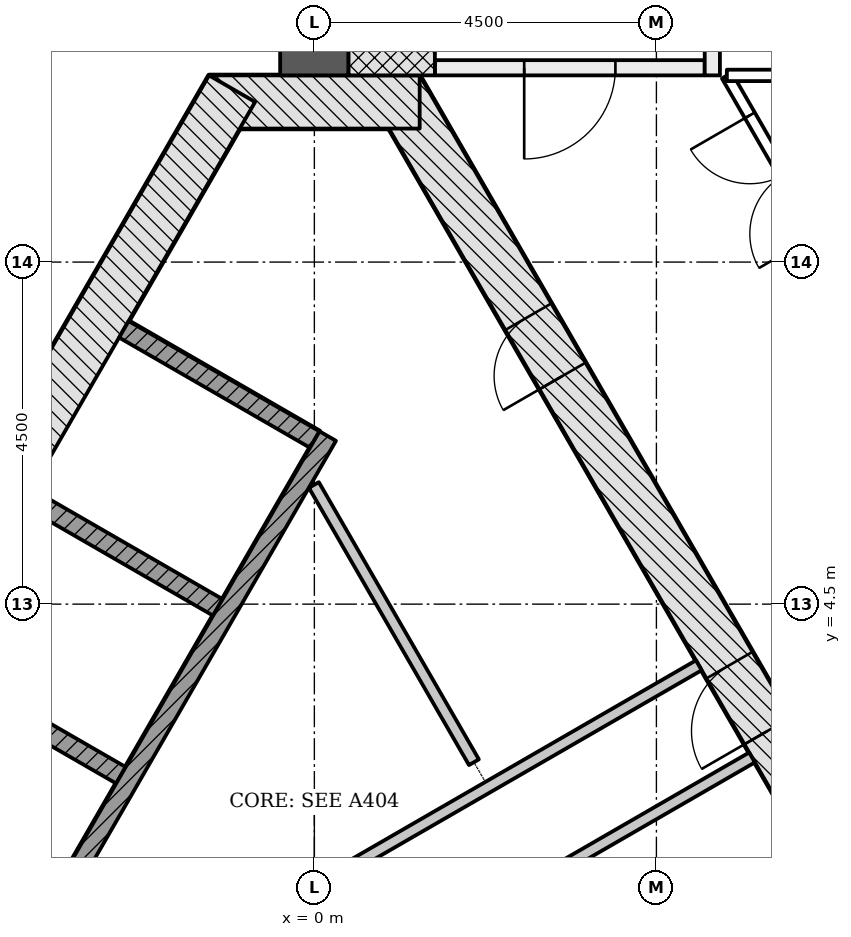
"""IFC4 building model, lengths in metres.
Left out: names, types, materials, properties, quantities, classifications, styles, units other than length and angle.
Written with IfcOpenShell. Run it as: python <this file> out.ifc"""

import sys

from ifc_helpers import new_model, si_unit, direction, frame, frame_2d, origin, place, context, subcontext, project, spatial, rectangle, extrude, element, fill, save


model = new_model("IFC4")
c1 = context("Model", 3, precision=1e-05, world=origin(), true_north=direction((0.0, 1.0)))
c2 = subcontext(c1, "Body", "Model", "MODEL_VIEW")
j1 = project(units=[si_unit("LENGTHUNIT", "METRE"), si_unit("PLANEANGLEUNIT", "RADIAN")], contexts=[c1])
p1 = place(None, origin())
s1 = spatial("IfcSite", under=j1, at=p1, CompositionType="ELEMENT")
p2 = place(p1, origin())
s2 = spatial("IfcBuilding", under=s1, at=p2, CompositionType="ELEMENT")
p3 = place(p2, frame((0.0, 0.0, 15.0)))
s3 = spatial("IfcBuildingStorey", under=s2, at=p3, CompositionType="ELEMENT", Elevation=15.0)
p4 = place(p3, frame((10.311, -4.703, -0.25), z_axis=(0.0, 0.0, 1.0), x_axis=(-0.500001446645, 0.866024568562, 0.0)))
e1 = element("IfcWall", 1, at=p4, inside=s3, PredefinedType="SHEAR", context=c2, shape_type="SweptSolid", body=[
    extrude(rectangle(XDim=18.458, YDim=0.7, at=frame_2d((9.229, 0.0))), origin(), (0.0, 0.0, 1.0), 4.5),
])
p5 = place(p4, frame((8.7, 0.0, 0.25)))
e2 = element("IfcOpeningElement", 2, at=p5, cuts=e1, PredefinedType="OPENING", context=c2, shape_type="SweptSolid", body=[
    extrude(rectangle(XDim=1.0, YDim=2.1, at=frame_2d((0.5, 1.05))), frame((0.0, 0.36, 0.0), z_axis=(0.0, -1.0, 0.0), x_axis=(1.0, 0.0, 0.0)), (0.0, 0.0, 1.0), 0.72),
])
p6 = place(p4, frame((4.002, 0.0, 0.25)))
e3 = element("IfcOpeningElement", 3, at=p6, cuts=e1, PredefinedType="OPENING", context=c2, shape_type="SweptSolid", body=[
    extrude(rectangle(XDim=0.9, YDim=2.1, at=frame_2d((0.45, 1.05))), frame((0.0, 0.36, 0.0), z_axis=(0.0, -1.0, 0.0), x_axis=(1.0, 0.0, 0.0)), (0.0, 0.0, 1.0), 0.72),
])
p7 = place(p4, frame((14.093, 0.0, 0.25)))
e4 = element("IfcOpeningElement", 4, at=p7, cuts=e1, PredefinedType="OPENING", context=c2, shape_type="SweptSolid", body=[
    extrude(rectangle(XDim=0.9, YDim=2.1, at=frame_2d((0.45, 1.05))), frame((0.0, 0.36, 0.0), z_axis=(0.0, -1.0, 0.0), x_axis=(1.0, 0.0, 0.0)), (0.0, 0.0, 1.0), 0.72),
])
p8 = place(p3, frame((1.386, 11.106, -0.25), z_axis=(0.0, 0.0, 1.0), x_axis=(-1.0, 0.0, 0.0)))
e5 = element("IfcWall", 5, at=p8, inside=s3, PredefinedType="SHEAR", context=c2, shape_type="SweptSolid", body=[
    extrude(rectangle(XDim=2.771, YDim=0.7, at=frame_2d((1.386, 0.0))), origin(), (0.0, 0.0, 1.0), 4.5),
])
p9 = place(p3, frame((-1.083, 11.281, -0.25), z_axis=(0.0, 0.0, 1.0), x_axis=(-0.500001446645, -0.866024568562, 0.0)))
e6 = element("IfcWall", 6, at=p9, inside=s3, PredefinedType="SHEAR", context=c2, shape_type="SweptSolid", body=[
    extrude(rectangle(XDim=18.458, YDim=0.7, at=frame_2d((9.229, 0.0))), origin(), (0.0, 0.0, 1.0), 4.5),
])
p10 = place(p9, frame((8.979, 0.0, 0.25)))
e7 = element("IfcOpeningElement", 7, at=p10, cuts=e6, PredefinedType="OPENING", context=c2, shape_type="SweptSolid", body=[
    extrude(rectangle(XDim=1.2, YDim=2.1, at=frame_2d((0.6, 1.05))), frame((0.0, 0.36, 0.0), z_axis=(0.0, -1.0, 0.0), x_axis=(1.0, 0.0, 0.0)), (0.0, 0.0, 1.0), 0.72),
])
p11 = place(p9, frame((11.029, 0.0, 0.25)))
e8 = element("IfcOpeningElement", 8, at=p11, cuts=e6, PredefinedType="OPENING", context=c2, shape_type="SweptSolid", body=[
    extrude(rectangle(XDim=1.2, YDim=2.1, at=frame_2d((0.6, 1.05))), frame((0.0, 0.36, 0.0), z_axis=(0.0, -1.0, 0.0), x_axis=(1.0, 0.0, 0.0)), (0.0, 0.0, 1.0), 0.72),
])
p12 = place(p3, frame((0.0, 11.456, -0.25), z_axis=(0.0, 0.0, 1.0), x_axis=(0.0, 1.0, 0.0)))
e9 = element("IfcWall", 9, at=p12, inside=s3, PredefinedType="SHEAR", context=c2, shape_type="SweptSolid", body=[
    extrude(rectangle(XDim=14.633, YDim=0.9, at=frame_2d((7.316, 0.0))), origin(), (0.0, 0.0, 1.0), 4.5),
])
p13 = place(p12, frame((7.35, 0.0, 0.25)))
e10 = element("IfcOpeningElement", 10, at=p13, cuts=e9, PredefinedType="OPENING", context=c2, shape_type="SweptSolid", body=[
    extrude(rectangle(XDim=1.5, YDim=2.1, at=frame_2d((0.75, 1.05))), frame((0.0, 0.46, 0.0), z_axis=(0.0, -1.0, 0.0), x_axis=(1.0, 0.0, 0.0)), (0.0, 0.0, 1.0), 0.92),
])
p14 = place(p3, frame((-2.506, 8.115, -0.25), z_axis=(0.0, 0.0, 1.0), x_axis=(0.865996321171, -0.50005036918, 0.0)))
e11 = element("IfcWall", 11, at=p14, inside=s3, PredefinedType="PARTITIONING", context=c2, shape_type="SweptSolid", body=[
    extrude(rectangle(XDim=2.9, YDim=0.25, at=frame_2d((1.45, 0.0))), origin(), (0.0, 0.0, 1.0), 4.5),
])
for number, where, z_axis, x_axis in (
    (12, (-3.781, 5.907, -0.25), (0.0, 0.0, 1.0), (0.866, -0.5, 0.0)),
    (13, (-5.056, 3.699, -0.25), (0.0, 0.0, 1.0), (0.866, -0.5, 0.0)),
):
    element("IfcWall", number, at=place(p3, frame(where, z_axis=z_axis, x_axis=x_axis)), inside=s3, PredefinedType="PARTITIONING", context=c2, shape_type="SweptSolid", body=[
        extrude(rectangle(XDim=2.9, YDim=0.25, at=frame_2d((1.45, 0.0))), origin(), (0.0, 0.0, 1.0), 4.5),
    ])
p15 = place(p3, frame((0.176, 6.711, 0.0), z_axis=(0.0, 0.0, 1.0), x_axis=(-0.500004227369, -0.866022963098, 0.0)))
e14 = element("IfcWall", 14, at=p15, inside=s3, PredefinedType="PARTITIONING", context=c2, shape_type="SweptSolid", body=[
    extrude(rectangle(XDim=11.8, YDim=0.25, at=frame_2d((5.9, 0.0))), origin(), (0.0, 0.0, 1.0), 4.25),
])
p16 = place(p3, frame((-4.548, -1.851, 0.0), z_axis=(0.0, 0.0, 1.0), x_axis=(0.866023939251, 0.500002536638, 0.0)))
e15 = element("IfcWall", 15, at=p16, inside=s3, PredefinedType="PARTITIONING", context=c2, shape_type="SweptSolid", body=[
    extrude(rectangle(XDim=11.092, YDim=0.15, at=frame_2d((5.546, 0.0))), origin(), (0.0, 0.0, 1.0), 4.25),
])
p17 = place(p16, frame((3.497, 0.0, 0.0)))
e16 = element("IfcOpeningElement", 16, at=p17, cuts=e15, PredefinedType="OPENING", context=c2, shape_type="SweptSolid", body=[
    extrude(rectangle(XDim=0.9, YDim=2.1, at=frame_2d((0.45, 1.05))), frame((0.0, 0.085, 0.0), z_axis=(0.0, -1.0, 0.0), x_axis=(1.0, 0.0, 0.0)), (0.0, 0.0, 1.0), 0.17),
])
p18 = place(p3, frame((2.099, 2.42, 0.0), z_axis=(0.0, 0.0, 1.0), x_axis=(-0.499998449073, 0.866026299211, 0.0)))
e17 = element("IfcWall", 17, at=p18, inside=s3, PredefinedType="PARTITIONING", context=c2, shape_type="SweptSolid", body=[
    extrude(rectangle(XDim=4.211, YDim=0.15, at=frame_2d((2.106, 0.0))), origin(), (0.0, 0.0, 1.0), 4.25),
])
p19 = place(p3, frame((-4.454, -3.413, 0.0), z_axis=(0.0, 0.0, 1.0), x_axis=(0.86603043987, 0.499991277142, 0.0)))
e18 = element("IfcWall", 18, at=p19, inside=s3, PredefinedType="PARTITIONING", context=c2, shape_type="SweptSolid", body=[
    extrude(rectangle(XDim=11.792, YDim=0.15, at=frame_2d((5.896, 0.0))), origin(), (0.0, 0.0, 1.0), 4.25),
])
p20 = place(p19, frame((3.847, 0.0, 0.0)))
e19 = element("IfcOpeningElement", 19, at=p20, cuts=e18, PredefinedType="OPENING", context=c2, shape_type="SweptSolid", body=[
    extrude(rectangle(XDim=0.9, YDim=2.1, at=frame_2d((0.45, 1.05))), frame((0.0, 0.085, 0.0), z_axis=(0.0, -1.0, 0.0), x_axis=(1.0, 0.0, 0.0)), (0.0, 0.0, 1.0), 0.17),
])
p21 = place(p3, frame((5.135, 11.556, -0.25), z_axis=(0.0, 0.0, 1.0), x_axis=(-1.0, 0.0, 0.0)))
e20 = element("IfcWall", 20, at=p21, inside=s3, PredefinedType="SHEAR", context=c2, shape_type="SweptSolid", body=[
    extrude(rectangle(XDim=3.55, YDim=0.2, at=frame_2d((1.775, 0.0))), origin(), (0.0, 0.0, 1.0), 4.5),
])
p22 = place(p21, frame((1.175, 0.0, 0.25)))
e21 = element("IfcOpeningElement", 21, at=p22, cuts=e20, PredefinedType="OPENING", context=c2, shape_type="SweptSolid", body=[
    extrude(rectangle(XDim=1.2, YDim=2.1, at=frame_2d((0.6, 1.05))), frame((0.0, 0.11, 0.0), z_axis=(0.0, -1.0, 0.0), x_axis=(1.0, 0.0, 0.0)), (0.0, 0.0, 1.0), 0.22),
])
p23 = place(p3, frame((5.236, 11.456, -0.25), z_axis=(0.0, 0.0, 1.0), x_axis=(0.0, 1.0, 0.0)))
e22 = element("IfcWall", 22, at=p23, inside=s3, PredefinedType="SHEAR", context=c2, shape_type="SweptSolid", body=[
    extrude(rectangle(XDim=5.6, YDim=0.2, at=frame_2d((2.8, 0.0))), origin(), (0.0, 0.0, 1.0), 4.5),
])
p24 = place(p23, frame((0.45, 0.0, 0.25)))
e23 = element("IfcOpeningElement", 23, at=p24, cuts=e22, PredefinedType="OPENING", context=c2, shape_type="SweptSolid", body=[
    extrude(rectangle(XDim=1.2, YDim=2.1, at=frame_2d((0.6, 1.05))), frame((0.0, 0.11, 0.0), z_axis=(0.0, -1.0, 0.0), x_axis=(1.0, 0.0, 0.0)), (0.0, 0.0, 1.0), 0.22),
])
p25 = place(p3, frame((1.018, 11.456, -0.25), z_axis=(0.0, 0.0, 1.0), x_axis=(0.0, 1.0, 0.0)))
e24 = element("IfcWall", 24, at=p25, inside=s3, PredefinedType="SHEAR", context=c2, shape_type="SweptSolid", body=[
    extrude(rectangle(XDim=7.2, YDim=1.136, at=frame_2d((3.6, 0.0))), origin(), (0.0, 0.0, 1.0), 4.5),
])
p26 = place(p3, frame((6.854, 8.982, 0.0), z_axis=(0.0, 0.0, 1.0), x_axis=(-0.499919889281, 0.866071650789, 0.0)))
e25 = element("IfcWall", 25, at=p26, inside=s3, PredefinedType="PARTITIONING", context=c2, shape_type="SweptSolid", body=[
    extrude(rectangle(XDim=2.854, YDim=0.15, at=frame_2d((1.427, 0.0))), origin(), (0.0, 0.0, 1.0), 3.638),
])
p27 = place(p26, frame((0.45, 0.0, 0.0)))
e26 = element("IfcOpeningElement", 26, at=p27, cuts=e25, PredefinedType="OPENING", context=c2, shape_type="SweptSolid", body=[
    extrude(rectangle(XDim=1.8, YDim=2.1, at=frame_2d((0.9, 1.05))), frame((0.0, 0.085, 0.0), z_axis=(0.0, -1.0, 0.0), x_axis=(1.0, 0.0, 0.0)), (0.0, 0.0, 1.0), 0.17),
])
p28 = place(p3, frame((5.427, 11.456, 0.0), z_axis=(0.0, 0.0, 1.0), x_axis=(1.0, 0.0, 0.0)))
e27 = element("IfcWall", 27, at=p28, inside=s3, PredefinedType="PARTITIONING", context=c2, shape_type="SweptSolid", body=[
    extrude(rectangle(XDim=1.708, YDim=0.15, at=frame_2d((0.854, 0.0))), origin(), (0.0, 0.0, 1.0), 4.25),
])
p29 = place(p3, frame((-3.406, 14.956, 0.0), z_axis=(0.0, 0.0, 1.0), x_axis=(-0.500020940175, -0.866013313631, 0.0)))
e28 = element("IfcWall", 28, at=p29, inside=s3, PredefinedType="PARTITIONING", context=c2, shape_type="SweptSolid", body=[
    extrude(rectangle(XDim=9.7, YDim=0.15, at=frame_2d((4.85, 0.0))), origin(), (0.0, 0.0, 1.0), 3.638),
])
p30 = place(p29, frame((3.95, 0.0, 0.0)))
e29 = element("IfcOpeningElement", 29, at=p30, cuts=e28, PredefinedType="OPENING", context=c2, shape_type="SweptSolid", body=[
    extrude(rectangle(XDim=1.8, YDim=2.1, at=frame_2d((0.9, 1.05))), frame((0.0, 0.085, 0.0), z_axis=(0.0, -1.0, 0.0), x_axis=(1.0, 0.0, 0.0)), (0.0, 0.0, 1.0), 0.17),
])
p31 = place(p5, origin())
e30 = element("IfcDoor", 30, at=p31, inside=s3, OperationType="SINGLE_SWING_LEFT", PredefinedType="DOOR", context=c2, shape_type="SweptSolid", body=[
    extrude(rectangle(XDim=1.0, YDim=2.1, at=frame_2d((0.5, 1.05))), frame((0.0, 0.075, 0.0), z_axis=(0.0, -1.0, 0.0), x_axis=(1.0, 0.0, 0.0)), (0.0, 0.0, 1.0), 0.15),
])
fill(e2, e30)
p32 = place(p7, origin())
e31 = element("IfcDoor", 31, at=p32, inside=s3, OperationType="SINGLE_SWING_LEFT", PredefinedType="DOOR", context=c2, shape_type="SweptSolid", body=[
    extrude(rectangle(XDim=0.9, YDim=2.1, at=frame_2d((0.45, 1.05))), frame((0.0, 0.075, 0.0), z_axis=(0.0, -1.0, 0.0), x_axis=(1.0, 0.0, 0.0)), (0.0, 0.0, 1.0), 0.15),
])
fill(e4, e31)
p33 = place(p22, origin())
e32 = element("IfcDoor", 32, at=p33, inside=s3, OperationType="SINGLE_SWING_RIGHT", PredefinedType="DOOR", context=c2, shape_type="SweptSolid", body=[
    extrude(rectangle(XDim=1.2, YDim=2.1, at=frame_2d((0.6, 1.05))), frame((0.0, 0.025, 0.0), z_axis=(0.0, -1.0, 0.0), x_axis=(1.0, 0.0, 0.0)), (0.0, 0.0, 1.0), 0.05),
])
fill(e21, e32)
p34 = place(p27, origin())
e33 = element("IfcDoor", 33, at=p34, inside=s3, OperationType="DOUBLE_DOOR_SINGLE_SWING", PredefinedType="DOOR", context=c2, shape_type="SweptSolid", body=[
    extrude(rectangle(XDim=1.8, YDim=2.1, at=frame_2d((0.9, 1.05))), frame((0.0, 0.025, 0.0), z_axis=(0.0, -1.0, 0.0), x_axis=(1.0, 0.0, 0.0)), (0.0, 0.0, 1.0), 0.05),
])
fill(e26, e33)
save(model, sys.argv[1])
